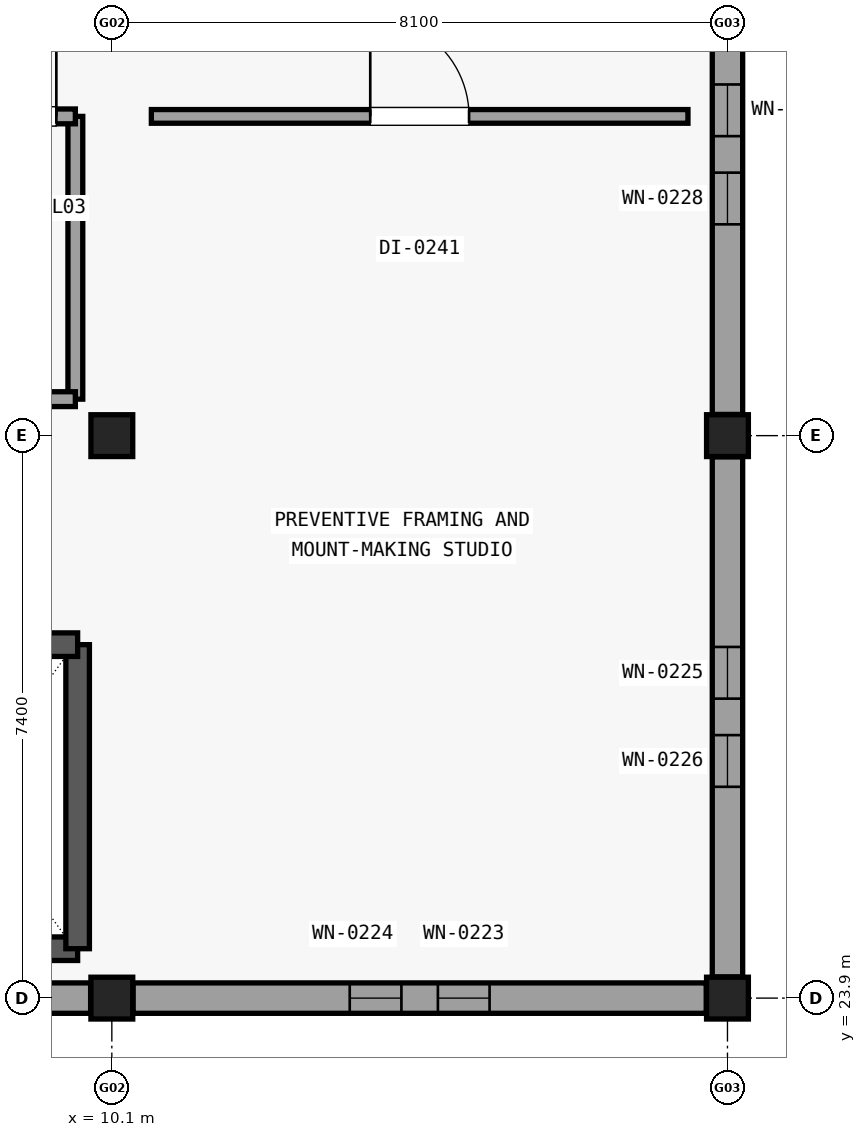
"""IFC4 building model, lengths in metres.
Left out: names, types, materials, properties, quantities, classifications, styles, units other than length and angle.
Written with IfcOpenShell. Run it as: python <this file> out.ifc"""

import sys

from ifc_helpers import new_model, si_unit, direction, frame, frame_2d, origin, origin_2d, place, context, subcontext, project, spatial, rectangle, extrude, element, fill, save


model = new_model("IFC4")
c1 = context("Model", 3, precision=1e-05, world=origin(), true_north=direction((0.0, 1.0)))
c2 = subcontext(c1, "Body", "Model", "MODEL_VIEW")
j1 = project(units=[si_unit("LENGTHUNIT", "METRE"), si_unit("PLANEANGLEUNIT", "RADIAN")], contexts=[c1])
p1 = place(None, origin())
s1 = spatial("IfcSite", under=j1, at=p1, CompositionType="ELEMENT")
p2 = place(p1, origin())
s2 = spatial("IfcBuilding", under=s1, at=p2, CompositionType="ELEMENT")
p3 = place(p2, frame((0.0, 0.0, 13.8)))
s3 = spatial("IfcBuildingStorey", under=s2, at=p3, CompositionType="ELEMENT", Elevation=13.8)
for number, where, z_axis, x_axis in (
    (1, (10.1, 23.9, 0.0), (0.0, 0.0, 1.0), (1.0, 0.0, 0.0)),
    (2, (10.1, 31.3, 0.0), (0.0, 0.0, 1.0), (1.0, 0.0, 0.0)),
    (3, (18.2, 23.9, 0.0), (0.0, 0.0, 1.0), (1.0, 0.0, 0.0)),
    (4, (18.2, 31.3, 0.0), (0.0, 0.0, 1.0), (1.0, 0.0, 0.0)),
):
    element("IfcColumn", number, at=place(p3, frame(where, z_axis=z_axis, x_axis=x_axis)), inside=s3, PredefinedType="COLUMN", context=c2, shape_type="SweptSolid", body=[
        extrude(rectangle(XDim=0.55, YDim=0.55, at=origin_2d()), origin(), (0.0, 0.0, 1.0), 3.38),
    ])
p4 = place(p3, frame((9.821, 23.9, 0.0), z_axis=(0.0, 0.0, 1.0), x_axis=(-1.0, 0.0, 0.0)))
e5 = element("IfcWall", 5, at=p4, inside=s3, PredefinedType="SOLIDWALL", context=c2, shape_type="SweptSolid", body=[
    extrude(rectangle(XDim=7.542, YDim=0.4, at=frame_2d((3.771, 0.0))), origin(), (0.0, 0.0, 1.0), 2.908),
])
p5 = place(p4, frame((2.851, 0.0, 0.6)))
e6 = element("IfcOpeningElement", 6, at=p5, cuts=e5, PredefinedType="OPENING", context=c2, shape_type="SweptSolid", body=[
    extrude(rectangle(XDim=0.68, YDim=1.78, at=frame_2d((0.34, 0.89))), frame((0.0, 0.21, 0.0), z_axis=(0.0, -1.0, 0.0), x_axis=(1.0, 0.0, 0.0)), (0.0, 0.0, 1.0), 0.42),
])
p6 = place(p4, frame((4.011, 0.0, 0.6)))
e7 = element("IfcOpeningElement", 7, at=p6, cuts=e5, PredefinedType="OPENING", context=c2, shape_type="SweptSolid", body=[
    extrude(rectangle(XDim=0.68, YDim=1.78, at=frame_2d((0.34, 0.89))), frame((0.0, 0.21, 0.0), z_axis=(0.0, -1.0, 0.0), x_axis=(1.0, 0.0, 0.0)), (0.0, 0.0, 1.0), 0.42),
])
p7 = place(p3, frame((17.921, 23.9, 0.0), z_axis=(0.0, 0.0, 1.0), x_axis=(-1.0, 0.0, 0.0)))
e8 = element("IfcWall", 8, at=p7, inside=s3, PredefinedType="SOLIDWALL", context=c2, shape_type="SweptSolid", body=[
    extrude(rectangle(XDim=7.542, YDim=0.4, at=frame_2d((3.771, 0.0))), origin(), (0.0, 0.0, 1.0), 2.908),
])
p8 = place(p7, frame((2.851, 0.0, 0.6)))
e9 = element("IfcOpeningElement", 9, at=p8, cuts=e8, PredefinedType="OPENING", context=c2, shape_type="SweptSolid", body=[
    extrude(rectangle(XDim=0.68, YDim=1.78, at=frame_2d((0.34, 0.89))), frame((0.0, 0.21, 0.0), z_axis=(0.0, -1.0, 0.0), x_axis=(1.0, 0.0, 0.0)), (0.0, 0.0, 1.0), 0.42),
])
p9 = place(p7, frame((4.011, 0.0, 0.6)))
e10 = element("IfcOpeningElement", 10, at=p9, cuts=e8, PredefinedType="OPENING", context=c2, shape_type="SweptSolid", body=[
    extrude(rectangle(XDim=0.68, YDim=1.78, at=frame_2d((0.34, 0.89))), frame((0.0, 0.21, 0.0), z_axis=(0.0, -1.0, 0.0), x_axis=(1.0, 0.0, 0.0)), (0.0, 0.0, 1.0), 0.42),
])
p10 = place(p3, frame((18.2, 31.021, 0.0), z_axis=(0.0, 0.0, 1.0), x_axis=(0.0, -1.0, 0.0)))
e11 = element("IfcWall", 11, at=p10, inside=s3, PredefinedType="SOLIDWALL", context=c2, shape_type="SweptSolid", body=[
    extrude(rectangle(XDim=6.842, YDim=0.4, at=frame_2d((3.421, 0.0))), origin(), (0.0, 0.0, 1.0), 2.908),
])
p11 = place(p10, frame((2.501, 0.0, 0.6)))
e12 = element("IfcOpeningElement", 12, at=p11, cuts=e11, PredefinedType="OPENING", context=c2, shape_type="SweptSolid", body=[
    extrude(rectangle(XDim=0.68, YDim=1.78, at=frame_2d((0.34, 0.89))), frame((0.0, 0.21, 0.0), z_axis=(0.0, -1.0, 0.0), x_axis=(1.0, 0.0, 0.0)), (0.0, 0.0, 1.0), 0.42),
])
p12 = place(p10, frame((3.661, 0.0, 0.6)))
e13 = element("IfcOpeningElement", 13, at=p12, cuts=e11, PredefinedType="OPENING", context=c2, shape_type="SweptSolid", body=[
    extrude(rectangle(XDim=0.68, YDim=1.78, at=frame_2d((0.34, 0.89))), frame((0.0, 0.21, 0.0), z_axis=(0.0, -1.0, 0.0), x_axis=(1.0, 0.0, 0.0)), (0.0, 0.0, 1.0), 0.42),
])
p13 = place(p3, frame((18.2, 38.421, 0.0), z_axis=(0.0, 0.0, 1.0), x_axis=(0.0, -1.0, 0.0)))
e14 = element("IfcWall", 14, at=p13, inside=s3, PredefinedType="SOLIDWALL", context=c2, shape_type="SweptSolid", body=[
    extrude(rectangle(XDim=6.842, YDim=0.4, at=frame_2d((3.421, 0.0))), origin(), (0.0, 0.0, 1.0), 2.908),
])
p14 = place(p13, frame((2.501, 0.0, 0.6)))
e15 = element("IfcOpeningElement", 15, at=p14, cuts=e14, PredefinedType="OPENING", context=c2, shape_type="SweptSolid", body=[
    extrude(rectangle(XDim=0.68, YDim=1.78, at=frame_2d((0.34, 0.89))), frame((0.0, 0.21, 0.0), z_axis=(0.0, -1.0, 0.0), x_axis=(1.0, 0.0, 0.0)), (0.0, 0.0, 1.0), 0.42),
])
p15 = place(p13, frame((3.661, 0.0, 0.6)))
e16 = element("IfcOpeningElement", 16, at=p15, cuts=e14, PredefinedType="OPENING", context=c2, shape_type="SweptSolid", body=[
    extrude(rectangle(XDim=0.68, YDim=1.78, at=frame_2d((0.34, 0.89))), frame((0.0, 0.21, 0.0), z_axis=(0.0, -1.0, 0.0), x_axis=(1.0, 0.0, 0.0)), (0.0, 0.0, 1.0), 0.42),
])
p16 = place(p3, frame((6.65, 24.55, 0.0), z_axis=(0.0, 0.0, 1.0), x_axis=(1.0, 0.0, 0.0)))
e17 = element("IfcWall", 17, at=p16, inside=s3, PredefinedType="SHEAR", context=c2, shape_type="SweptSolid", body=[
    extrude(rectangle(XDim=3.0, YDim=0.31, at=frame_2d((1.5, 0.0))), origin(), (0.0, 0.0, 1.0), 3.375),
])
p17 = place(p3, frame((9.65, 24.55, 0.0), z_axis=(0.0, 0.0, 1.0), x_axis=(0.0, 1.0, 0.0)))
e18 = element("IfcWall", 18, at=p17, inside=s3, PredefinedType="SHEAR", context=c2, shape_type="SweptSolid", body=[
    extrude(rectangle(XDim=4.0, YDim=0.31, at=frame_2d((2.0, 0.0))), origin(), (0.0, 0.0, 1.0), 3.375),
])
p18 = place(p3, frame((6.65, 28.55, 0.0), z_axis=(0.0, 0.0, 1.0), x_axis=(1.0, 0.0, 0.0)))
e19 = element("IfcWall", 19, at=p18, inside=s3, PredefinedType="SHEAR", context=c2, shape_type="SweptSolid", body=[
    extrude(rectangle(XDim=3.0, YDim=0.31, at=frame_2d((1.5, 0.0))), origin(), (0.0, 0.0, 1.0), 3.375),
])
p19 = place(p18, frame((0.4, 0.0, 0.0)))
e20 = element("IfcOpeningElement", 20, at=p19, cuts=e19, PredefinedType="OPENING", context=c2, shape_type="SweptSolid", body=[
    extrude(rectangle(XDim=2.2, YDim=2.55, at=frame_2d((1.1, 1.275))), frame((0.0, 0.165, 0.0), z_axis=(0.0, -1.0, 0.0), x_axis=(1.0, 0.0, 0.0)), (0.0, 0.0, 1.0), 0.33),
])
p20 = place(p3, frame((9.62, 31.78, 0.0), z_axis=(0.0, 0.0, 1.0), x_axis=(0.0, 1.0, 0.0)))
e21 = element("IfcWall", 21, at=p20, inside=s3, PredefinedType="PARTITIONING", context=c2, shape_type="SweptSolid", body=[
    extrude(rectangle(XDim=3.72, YDim=0.195, at=frame_2d((1.86, 0.0))), origin(), (0.0, 0.0, 1.0), 2.913),
])
p21 = place(p3, frame((6.65, 31.78, 0.0), z_axis=(0.0, 0.0, 1.0), x_axis=(1.0, 0.0, 0.0)))
e22 = element("IfcWall", 22, at=p21, inside=s3, PredefinedType="PARTITIONING", context=c2, shape_type="SweptSolid", body=[
    extrude(rectangle(XDim=2.97, YDim=0.195, at=frame_2d((1.485, 0.0))), origin(), (0.0, 0.0, 1.0), 2.913),
])
p22 = place(p3, frame((6.65, 35.5, 0.0), z_axis=(0.0, 0.0, 1.0), x_axis=(1.0, 0.0, 0.0)))
e23 = element("IfcWall", 23, at=p22, inside=s3, PredefinedType="PARTITIONING", context=c2, shape_type="SweptSolid", body=[
    extrude(rectangle(XDim=2.97, YDim=0.195, at=frame_2d((1.485, 0.0))), origin(), (0.0, 0.0, 1.0), 2.913),
])
p23 = place(p22, frame((0.25, 0.0, 0.0)))
e24 = element("IfcOpeningElement", 24, at=p23, cuts=e23, PredefinedType="OPENING", context=c2, shape_type="SweptSolid", body=[
    extrude(rectangle(XDim=0.95, YDim=2.1, at=frame_2d((0.475, 1.05))), frame((0.0, 0.107, 0.0), z_axis=(0.0, -1.0, 0.0), x_axis=(1.0, 0.0, 0.0)), (0.0, 0.0, 1.0), 0.215),
])
p24 = place(p22, frame((1.82, 0.0, 0.0)))
e25 = element("IfcOpeningElement", 25, at=p24, cuts=e23, PredefinedType="OPENING", context=c2, shape_type="SweptSolid", body=[
    extrude(rectangle(XDim=0.9, YDim=2.1, at=frame_2d((0.45, 1.05))), frame((0.0, 0.107, 0.0), z_axis=(0.0, -1.0, 0.0), x_axis=(1.0, 0.0, 0.0)), (0.0, 0.0, 1.0), 0.215),
])
p25 = place(p3, frame((10.62, 35.5, 0.0), z_axis=(0.0, 0.0, 1.0), x_axis=(1.0, 0.0, 0.0)))
e26 = element("IfcWall", 26, at=p25, inside=s3, PredefinedType="PARTITIONING", context=c2, shape_type="SweptSolid", body=[
    extrude(rectangle(XDim=7.06, YDim=0.18, at=frame_2d((3.53, 0.0))), origin(), (0.0, 0.0, 1.0), 2.913),
])
p26 = place(p25, frame((2.88, 0.0, 0.0)))
e27 = element("IfcOpeningElement", 27, at=p26, cuts=e26, PredefinedType="OPENING", context=c2, shape_type="SweptSolid", body=[
    extrude(rectangle(XDim=1.3, YDim=2.2, at=frame_2d((0.65, 1.1))), frame((0.0, 0.1, 0.0), z_axis=(0.0, -1.0, 0.0), x_axis=(1.0, 0.0, 0.0)), (0.0, 0.0, 1.0), 0.2),
])
p27 = place(p8, origin())
e28 = element("IfcWindow", 28, at=p27, inside=s3, PartitioningType="SINGLE_PANEL", PredefinedType="WINDOW", context=c2, shape_type="SweptSolid", body=[
    extrude(rectangle(XDim=0.68, YDim=1.78, at=frame_2d((0.34, 0.89))), frame((0.0, 0.03, 0.0), z_axis=(0.0, -1.0, 0.0), x_axis=(1.0, 0.0, 0.0)), (0.0, 0.0, 1.0), 0.06),
])
fill(e9, e28)
p28 = place(p9, origin())
e29 = element("IfcWindow", 29, at=p28, inside=s3, PartitioningType="SINGLE_PANEL", PredefinedType="WINDOW", context=c2, shape_type="SweptSolid", body=[
    extrude(rectangle(XDim=0.68, YDim=1.78, at=frame_2d((0.34, 0.89))), frame((0.0, 0.03, 0.0), z_axis=(0.0, -1.0, 0.0), x_axis=(1.0, 0.0, 0.0)), (0.0, 0.0, 1.0), 0.06),
])
fill(e10, e29)
p29 = place(p11, origin())
e30 = element("IfcWindow", 30, at=p29, inside=s3, PartitioningType="SINGLE_PANEL", PredefinedType="WINDOW", context=c2, shape_type="SweptSolid", body=[
    extrude(rectangle(XDim=0.68, YDim=1.78, at=frame_2d((0.34, 0.89))), frame((0.0, 0.03, 0.0), z_axis=(0.0, -1.0, 0.0), x_axis=(1.0, 0.0, 0.0)), (0.0, 0.0, 1.0), 0.06),
])
fill(e12, e30)
p30 = place(p12, origin())
e31 = element("IfcWindow", 31, at=p30, inside=s3, PartitioningType="SINGLE_PANEL", PredefinedType="WINDOW", context=c2, shape_type="SweptSolid", body=[
    extrude(rectangle(XDim=0.68, YDim=1.78, at=frame_2d((0.34, 0.89))), frame((0.0, 0.03, 0.0), z_axis=(0.0, -1.0, 0.0), x_axis=(1.0, 0.0, 0.0)), (0.0, 0.0, 1.0), 0.06),
])
fill(e13, e31)
p31 = place(p14, origin())
e32 = element("IfcWindow", 32, at=p31, inside=s3, PartitioningType="SINGLE_PANEL", PredefinedType="WINDOW", context=c2, shape_type="SweptSolid", body=[
    extrude(rectangle(XDim=0.68, YDim=1.78, at=frame_2d((0.34, 0.89))), frame((0.0, 0.03, 0.0), z_axis=(0.0, -1.0, 0.0), x_axis=(1.0, 0.0, 0.0)), (0.0, 0.0, 1.0), 0.06),
])
fill(e15, e32)
p32 = place(p15, origin())
e33 = element("IfcWindow", 33, at=p32, inside=s3, PartitioningType="SINGLE_PANEL", PredefinedType="WINDOW", context=c2, shape_type="SweptSolid", body=[
    extrude(rectangle(XDim=0.68, YDim=1.78, at=frame_2d((0.34, 0.89))), frame((0.0, 0.03, 0.0), z_axis=(0.0, -1.0, 0.0), x_axis=(1.0, 0.0, 0.0)), (0.0, 0.0, 1.0), 0.06),
])
fill(e16, e33)
p33 = place(p24, origin())
e34 = element("IfcDoor", 34, at=p33, inside=s3, OperationType="SINGLE_SWING_RIGHT", PredefinedType="DOOR", context=c2, shape_type="SweptSolid", body=[
    extrude(rectangle(XDim=0.9, YDim=2.1, at=frame_2d((0.45, 1.05))), frame((0.0, 0.025, 0.0), z_axis=(0.0, -1.0, 0.0), x_axis=(1.0, 0.0, 0.0)), (0.0, 0.0, 1.0), 0.05),
])
fill(e25, e34)
p34 = place(p26, origin())
e35 = element("IfcDoor", 35, at=p34, inside=s3, OperationType="SINGLE_SWING_LEFT", PredefinedType="DOOR", context=c2, shape_type="SweptSolid", body=[
    extrude(rectangle(XDim=1.3, YDim=2.2, at=frame_2d((0.65, 1.1))), frame((0.0, 0.025, 0.0), z_axis=(0.0, -1.0, 0.0), x_axis=(1.0, 0.0, 0.0)), (0.0, 0.0, 1.0), 0.05),
])
fill(e27, e35)
save(model, sys.argv[1])
